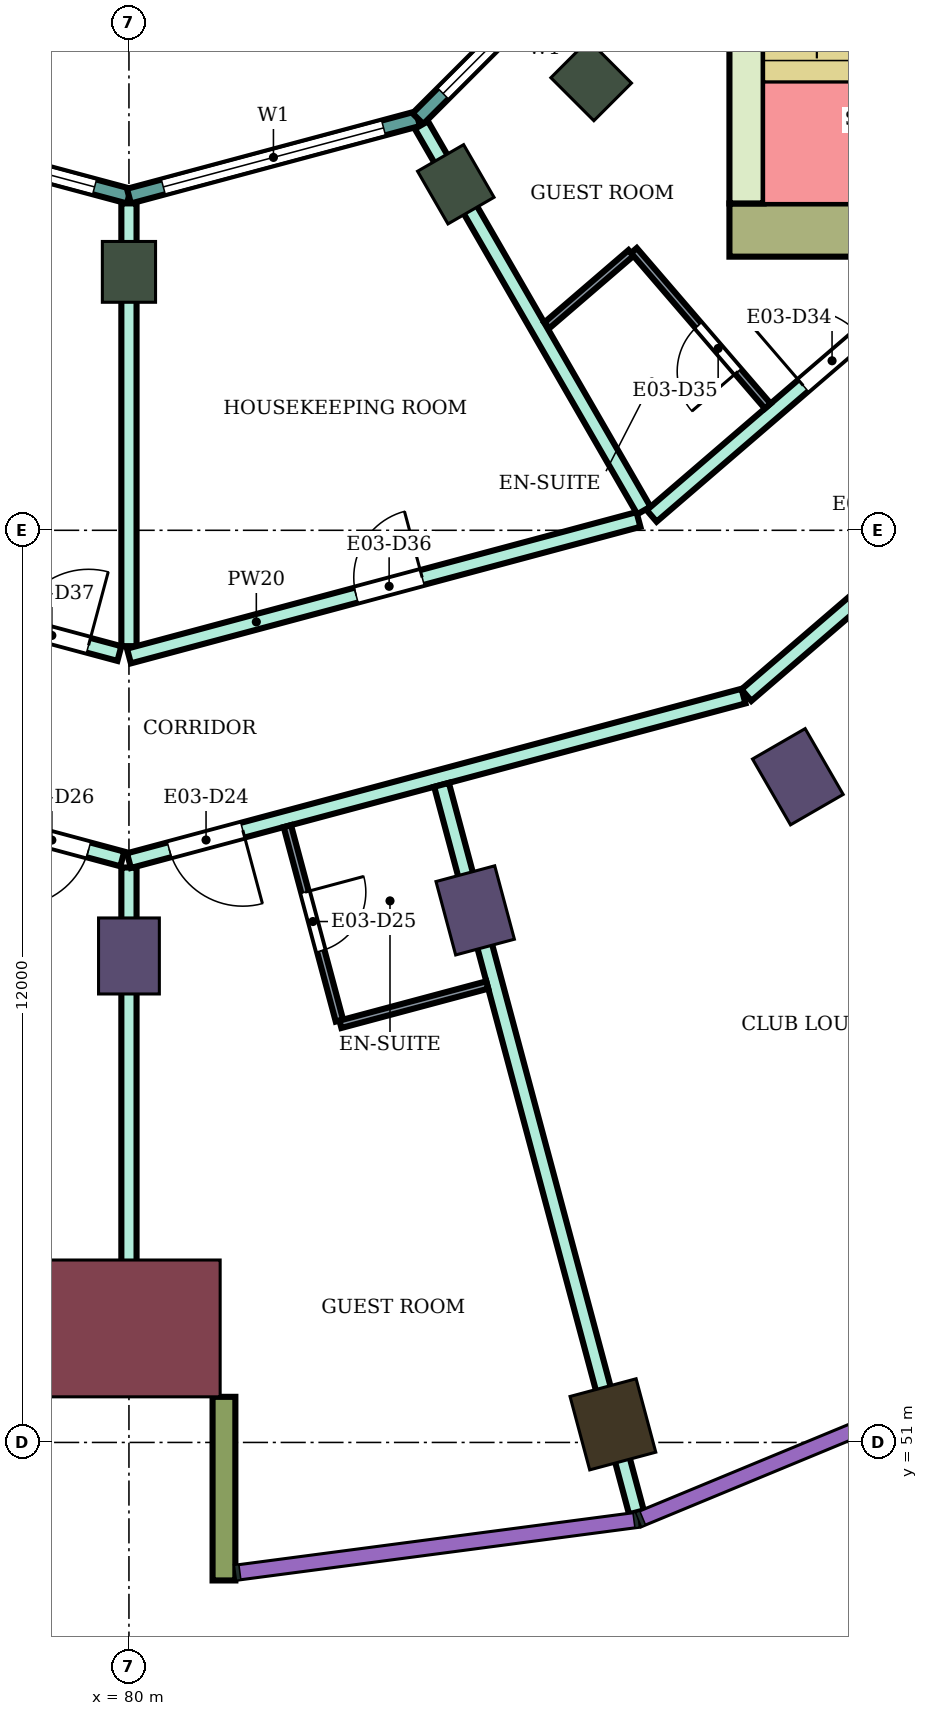
"""IFC4 building model, lengths in metres.
Left out: names, types, materials, properties, quantities, classifications, styles, units other than length and angle.
Written with IfcOpenShell. Run it as: python <this file> out.ifc"""

import sys

from ifc_helpers import new_model, si_unit, direction, frame, frame_2d, origin, origin_2d, place, context, subcontext, project, spatial, rectangle, extrude, element, fill, save


model = new_model("IFC4")
c1 = context("Model", 3, precision=1e-05, world=origin(), true_north=direction((0.0, 1.0)))
c2 = subcontext(c1, "Body", "Model", "MODEL_VIEW")
j1 = project(units=[si_unit("LENGTHUNIT", "METRE"), si_unit("PLANEANGLEUNIT", "RADIAN")], contexts=[c1])
p1 = place(None, origin())
s1 = spatial("IfcSite", under=j1, at=p1, CompositionType="ELEMENT")
p2 = place(p1, origin())
s2 = spatial("IfcBuilding", under=s1, at=p2, CompositionType="ELEMENT")
p3 = place(p2, frame((0.0, 0.0, 141.9)))
s3 = spatial("IfcBuildingStorey", under=s2, at=p3, CompositionType="ELEMENT", Elevation=141.9)
p4 = place(p3, frame((86.367, 51.238, 0.0), z_axis=(0.0, 0.0, 1.0), x_axis=(0.258819045103, -0.965925826289, 0.0)))
e1 = element("IfcColumn", 1, at=p4, inside=s3, PredefinedType="COLUMN", context=c2, shape_type="SweptSolid", body=[
    extrude(rectangle(XDim=1.0, YDim=0.9, at=origin_2d()), origin(), (0.0, 0.0, 1.0), 3.9),
])
for number, where, z_axis, x_axis in (
    (2, (80.0, 57.4, 0.0), (0.0, 0.0, 1.0), (0.0, -1.0, 0.0)),
    (3, (84.555, 58.0, 0.0), (0.0, 0.0, 1.0), (0.259, -0.966, 0.0)),
    (4, (88.8, 59.758, 0.0), (0.0, 0.0, 1.0), (0.5, -0.866, 0.0)),
):
    element("IfcColumn", number, at=place(p3, frame(where, z_axis=z_axis, x_axis=x_axis)), inside=s3, PredefinedType="COLUMN", context=c2, shape_type="SweptSolid", body=[
        extrude(rectangle(XDim=1.0, YDim=0.8, at=origin_2d()), origin(), (0.0, 0.0, 1.0), 3.9),
    ])
for number, where, z_axis, x_axis in (
    (5, (80.0, 66.4, 0.0), (0.0, 0.0, 1.0), (0.0, -1.0, 0.0)),
    (6, (84.3, 67.552, 0.0), (0.0, 0.0, 1.0), (0.5, -0.866, 0.0)),
    (7, (86.081, 68.919, 0.0), (0.0, 0.0, 1.0), (0.707, -0.707, 0.0)),
):
    element("IfcColumn", number, at=place(p3, frame(where, z_axis=z_axis, x_axis=x_axis)), inside=s3, PredefinedType="COLUMN", context=c2, shape_type="SweptSolid", body=[
        extrude(rectangle(XDim=0.8, YDim=0.7, at=origin_2d()), origin(), (0.0, 0.0, 1.0), 3.9),
    ])
p5 = place(p3, frame((80.0, 52.5, 0.0), z_axis=(0.0, 0.0, 1.0), x_axis=(0.0, -1.0, 0.0)))
e8 = element("IfcColumn", 8, at=p5, inside=s3, PredefinedType="COLUMN", context=c2, shape_type="SweptSolid", body=[
    extrude(rectangle(XDim=1.8, YDim=2.4, at=origin_2d()), origin(), (0.0, 0.0, 1.0), 3.9),
])
p6 = place(p3, frame((87.9, 66.95, 0.0), z_axis=(0.0, 0.0, 1.0), x_axis=(1.0, 0.0, 0.0)))
e9 = element("IfcWall", 9, at=p6, inside=s3, PredefinedType="SHEAR", context=c2, shape_type="SweptSolid", body=[
    extrude(rectangle(XDim=14.8, YDim=0.7, at=frame_2d((7.4, 0.0))), origin(), (0.0, 0.0, 1.0), 3.58),
])
p7 = place(p6, frame((4.2, 0.0, 0.0)))
e10 = element("IfcOpeningElement", 10, at=p7, cuts=e9, PredefinedType="OPENING", context=c2, shape_type="SweptSolid", body=[
    extrude(rectangle(XDim=2.4, YDim=2.4, at=frame_2d((1.2, 1.2))), frame((0.0, 0.36, 0.0), z_axis=(0.0, -1.0, 0.0), x_axis=(1.0, 0.0, 0.0)), (0.0, 0.0, 1.0), 0.72),
])
p8 = place(p3, frame((88.125, 67.3, 0.0), z_axis=(0.0, 0.0, 1.0), x_axis=(0.0, 1.0, 0.0)))
e11 = element("IfcWall", 11, at=p8, inside=s3, PredefinedType="SHEAR", context=c2, shape_type="SweptSolid", body=[
    extrude(rectangle(XDim=7.7, YDim=0.45, at=frame_2d((3.85, 0.0))), origin(), (0.0, 0.0, 1.0), 3.58),
])
p9 = place(p3, frame((81.25, 51.6, 0.0), z_axis=(0.0, 0.0, 1.0), x_axis=(0.0, -1.0, 0.0)))
e12 = element("IfcWall", 12, at=p9, inside=s3, PredefinedType="NOTDEFINED", context=c2, shape_type="SweptSolid", body=[
    extrude(rectangle(XDim=2.416, YDim=0.3, at=frame_2d((1.208, 0.0))), origin(), (0.0, 0.0, 1.0), 3.9),
])
p10 = place(p3, frame((76.198, 68.415, 0.0), z_axis=(0.0, 0.0, 1.0), x_axis=(0.965933654434, -0.258789828301, 0.0)))
e13 = element("IfcWall", 13, at=p10, inside=s3, PredefinedType="NOTDEFINED", context=c2, shape_type="SweptSolid", body=[
    extrude(rectangle(XDim=3.936, YDim=0.2, at=frame_2d((1.968, 0.0))), origin(), (0.0, 0.0, 1.0), 3.9),
])
p11 = place(p10, frame((0.468, 0.0, 0.9)))
e14 = element("IfcOpeningElement", 14, at=p11, cuts=e13, PredefinedType="OPENING", context=c2, shape_type="SweptSolid", body=[
    extrude(rectangle(XDim=3.0, YDim=2.3, at=frame_2d((1.5, 1.15))), frame((0.0, 0.11, 0.0), z_axis=(0.0, -1.0, 0.0), x_axis=(1.0, 0.0, 0.0)), (0.0, 0.0, 1.0), 0.22),
])
p12 = place(p3, frame((80.0, 67.396, 0.0), z_axis=(0.0, 0.0, 1.0), x_axis=(0.965933654434, 0.258789828301, 0.0)))
e15 = element("IfcWall", 15, at=p12, inside=s3, PredefinedType="NOTDEFINED", context=c2, shape_type="SweptSolid", body=[
    extrude(rectangle(XDim=3.936, YDim=0.2, at=frame_2d((1.968, 0.0))), origin(), (0.0, 0.0, 1.0), 3.9),
])
p13 = place(p12, frame((0.468, 0.0, 0.9)))
e16 = element("IfcOpeningElement", 16, at=p13, cuts=e15, PredefinedType="OPENING", context=c2, shape_type="SweptSolid", body=[
    extrude(rectangle(XDim=3.0, YDim=2.3, at=frame_2d((1.5, 1.15))), frame((0.0, 0.11, 0.0), z_axis=(0.0, -1.0, 0.0), x_axis=(1.0, 0.0, 0.0)), (0.0, 0.0, 1.0), 0.22),
])
p14 = place(p3, frame((83.802, 68.415, 0.0), z_axis=(0.0, 0.0, 1.0), x_axis=(0.707106781187, 0.707106781187, 0.0)))
e17 = element("IfcWall", 17, at=p14, inside=s3, PredefinedType="NOTDEFINED", context=c2, shape_type="SweptSolid", body=[
    extrude(rectangle(XDim=3.936, YDim=0.2, at=frame_2d((1.968, 0.0))), origin(), (0.0, 0.0, 1.0), 3.9),
])
p15 = place(p14, frame((0.468, 0.0, 0.9)))
e18 = element("IfcOpeningElement", 18, at=p15, cuts=e17, PredefinedType="OPENING", context=c2, shape_type="SweptSolid", body=[
    extrude(rectangle(XDim=3.0, YDim=2.3, at=frame_2d((1.5, 1.15))), frame((0.0, 0.11, 0.0), z_axis=(0.0, -1.0, 0.0), x_axis=(1.0, 0.0, 0.0)), (0.0, 0.0, 1.0), 0.22),
])
p16 = place(p3, frame((71.877, 60.832, 0.0), z_axis=(0.0, 0.0, 1.0), x_axis=(0.965852509869, -0.259092510851, 0.0)))
e19 = element("IfcWall", 19, at=p16, inside=s3, PredefinedType="PARTITIONING", context=c2, shape_type="SweptSolid", body=[
    extrude(rectangle(XDim=8.32, YDim=0.2, at=frame_2d((4.16, 0.0))), origin(), (0.0, 0.0, 1.0), 3.45),
])
p17 = place(p16, frame((6.86, 0.0, 0.0)))
e20 = element("IfcOpeningElement", 20, at=p17, cuts=e19, PredefinedType="OPENING", context=c2, shape_type="SweptSolid", body=[
    extrude(rectangle(XDim=1.0, YDim=2.1, at=frame_2d((0.5, 1.05))), frame((0.0, 0.11, 0.0), z_axis=(0.0, -1.0, 0.0), x_axis=(1.0, 0.0, 0.0)), (0.0, 0.0, 1.0), 0.22),
])
p18 = place(p16, frame((0.55, 0.0, 0.0)))
e21 = element("IfcOpeningElement", 21, at=p18, cuts=e19, PredefinedType="OPENING", context=c2, shape_type="SweptSolid", body=[
    extrude(rectangle(XDim=1.0, YDim=2.1, at=frame_2d((0.5, 1.05))), frame((0.0, 0.11, 0.0), z_axis=(0.0, -1.0, 0.0), x_axis=(1.0, 0.0, 0.0)), (0.0, 0.0, 1.0), 0.22),
])
p19 = place(p3, frame((73.297, 63.143, 0.0), z_axis=(0.0, 0.0, 1.0), x_axis=(0.965859030528, -0.25906820173, 0.0)))
e22 = element("IfcWall", 22, at=p19, inside=s3, PredefinedType="PARTITIONING", context=c2, shape_type="SweptSolid", body=[
    extrude(rectangle(XDim=6.81, YDim=0.2, at=frame_2d((3.405, 0.0))), origin(), (0.0, 0.0, 1.0), 3.45),
])
p20 = place(p19, frame((5.39, 0.0, 0.0)))
e23 = element("IfcOpeningElement", 23, at=p20, cuts=e22, PredefinedType="OPENING", context=c2, shape_type="SweptSolid", body=[
    extrude(rectangle(XDim=1.0, YDim=2.1, at=frame_2d((0.5, 1.05))), frame((0.0, 0.11, 0.0), z_axis=(0.0, -1.0, 0.0), x_axis=(1.0, 0.0, 0.0)), (0.0, 0.0, 1.0), 0.22),
])
p21 = place(p3, frame((80.0, 51.8, 0.0), z_axis=(0.0, 0.0, 1.0), x_axis=(0.0, 1.0, 0.0)))
e24 = element("IfcWall", 24, at=p21, inside=s3, PredefinedType="PARTITIONING", context=c2, shape_type="SweptSolid", body=[
    extrude(rectangle(XDim=6.764, YDim=0.2, at=frame_2d((3.382, 0.0))), origin(), (0.0, 0.0, 1.0), 3.45),
])
p22 = place(p3, frame((80.0, 58.654, 0.0), z_axis=(0.0, 0.0, 1.0), x_axis=(0.965979808777, 0.25861749561, 0.0)))
e25 = element("IfcWall", 25, at=p22, inside=s3, PredefinedType="PARTITIONING", context=c2, shape_type="SweptSolid", body=[
    extrude(rectangle(XDim=8.37, YDim=0.2, at=frame_2d((4.185, 0.0))), origin(), (0.0, 0.0, 1.0), 3.45),
])
p23 = place(p22, frame((0.55, 0.0, 0.0)))
e26 = element("IfcOpeningElement", 26, at=p23, cuts=e25, PredefinedType="OPENING", context=c2, shape_type="SweptSolid", body=[
    extrude(rectangle(XDim=1.0, YDim=2.1, at=frame_2d((0.5, 1.05))), frame((0.0, 0.11, 0.0), z_axis=(0.0, -1.0, 0.0), x_axis=(1.0, 0.0, 0.0)), (0.0, 0.0, 1.0), 0.22),
])
p24 = place(p3, frame((80.0, 61.476, 0.0), z_axis=(0.0, 0.0, 1.0), x_axis=(0.0, 1.0, 0.0)))
e27 = element("IfcWall", 27, at=p24, inside=s3, PredefinedType="PARTITIONING", context=c2, shape_type="SweptSolid", body=[
    extrude(rectangle(XDim=5.825, YDim=0.2, at=frame_2d((2.913, 0.0))), origin(), (0.0, 0.0, 1.0), 3.45),
])
p25 = place(p3, frame((80.0, 61.346, 0.0), z_axis=(0.0, 0.0, 1.0), x_axis=(0.965915385935, 0.25885800589, 0.0)))
e28 = element("IfcWall", 28, at=p25, inside=s3, PredefinedType="PARTITIONING", context=c2, shape_type="SweptSolid", body=[
    extrude(rectangle(XDim=6.94, YDim=0.2, at=frame_2d((3.47, 0.0))), origin(), (0.0, 0.0, 1.0), 3.45),
])
p26 = place(p25, frame((3.094, 0.0, 0.0)))
e29 = element("IfcOpeningElement", 29, at=p26, cuts=e28, PredefinedType="OPENING", context=c2, shape_type="SweptSolid", body=[
    extrude(rectangle(XDim=0.9, YDim=2.1, at=frame_2d((0.45, 1.05))), frame((0.0, 0.11, 0.0), z_axis=(0.0, -1.0, 0.0), x_axis=(1.0, 0.0, 0.0)), (0.0, 0.0, 1.0), 0.22),
])
p27 = place(p3, frame((83.847, 68.332, 0.0), z_axis=(0.0, 0.0, 1.0), x_axis=(0.499901724708, -0.866082135617, 0.0)))
e30 = element("IfcWall", 30, at=p27, inside=s3, PredefinedType="PARTITIONING", context=c2, shape_type="SweptSolid", body=[
    extrude(rectangle(XDim=5.855, YDim=0.2, at=frame_2d((2.928, 0.0))), origin(), (0.0, 0.0, 1.0), 3.45),
])
p28 = place(p3, frame((84.112, 59.652, 0.0), z_axis=(0.0, 0.0, 1.0), x_axis=(0.25878658041, -0.965934524593, 0.0)))
e31 = element("IfcWall", 31, at=p28, inside=s3, PredefinedType="PARTITIONING", context=c2, shape_type="SweptSolid", body=[
    extrude(rectangle(XDim=9.909, YDim=0.2, at=frame_2d((4.954, 0.0))), origin(), (0.0, 0.0, 1.0), 3.45),
])
p29 = place(p3, frame((86.877, 63.189, 0.0), z_axis=(0.0, 0.0, 1.0), x_axis=(0.758164888471, 0.652062881853, 0.0)))
e32 = element("IfcWall", 32, at=p29, inside=s3, PredefinedType="PARTITIONING", context=c2, shape_type="SweptSolid", body=[
    extrude(rectangle(XDim=5.23, YDim=0.2, at=frame_2d((2.615, 0.0))), origin(), (0.0, 0.0, 1.0), 3.45),
])
p30 = place(p29, frame((2.63, 0.0, 0.0)))
e33 = element("IfcOpeningElement", 33, at=p30, cuts=e32, PredefinedType="OPENING", context=c2, shape_type="SweptSolid", body=[
    extrude(rectangle(XDim=1.0, YDim=2.1, at=frame_2d((0.5, 1.05))), frame((0.0, 0.11, 0.0), z_axis=(0.0, -1.0, 0.0), x_axis=(1.0, 0.0, 0.0)), (0.0, 0.0, 1.0), 0.22),
])
p31 = place(p3, frame((88.123, 60.831, 0.0), z_axis=(0.0, 0.0, 1.0), x_axis=(0.758118199374, 0.652117164149, 0.0)))
e34 = element("IfcWall", 34, at=p31, inside=s3, PredefinedType="PARTITIONING", context=c2, shape_type="SweptSolid", body=[
    extrude(rectangle(XDim=6.486, YDim=0.2, at=frame_2d((3.243, 0.0))), origin(), (0.0, 0.0, 1.0), 3.45),
])
p32 = place(p31, frame((2.073, 0.0, 0.0)))
e35 = element("IfcOpeningElement", 35, at=p32, cuts=e34, PredefinedType="OPENING", context=c2, shape_type="SweptSolid", body=[
    extrude(rectangle(XDim=1.8, YDim=2.1, at=frame_2d((0.9, 1.05))), frame((0.0, 0.11, 0.0), z_axis=(0.0, -1.0, 0.0), x_axis=(1.0, 0.0, 0.0)), (0.0, 0.0, 1.0), 0.22),
])
p33 = place(p3, frame((82.084, 59.108, 0.0), z_axis=(0.0, 0.0, 1.0), x_axis=(0.258591746437, -0.965986702121, 0.0)))
e36 = element("IfcWall", 36, at=p33, inside=s3, PredefinedType="PARTITIONING", context=c2, shape_type="SweptSolid", body=[
    extrude(rectangle(XDim=2.649, YDim=0.1, at=frame_2d((1.325, 0.0))), origin(), (0.0, 0.0, 1.0), 3.45),
])
p34 = place(p33, frame((0.9, 0.0, 0.0)))
e37 = element("IfcOpeningElement", 37, at=p34, cuts=e36, PredefinedType="OPENING", context=c2, shape_type="SweptSolid", body=[
    extrude(rectangle(XDim=0.8, YDim=2.1, at=frame_2d((0.4, 1.05))), frame((0.0, 0.06, 0.0), z_axis=(0.0, -1.0, 0.0), x_axis=(1.0, 0.0, 0.0)), (0.0, 0.0, 1.0), 0.12),
])
p35 = place(p3, frame((82.782, 56.501, 0.0), z_axis=(0.0, 0.0, 1.0), x_axis=(0.966003594778, 0.258528634539, 0.0)))
e38 = element("IfcWall", 38, at=p35, inside=s3, PredefinedType="PARTITIONING", context=c2, shape_type="SweptSolid", body=[
    extrude(rectangle(XDim=2.0, YDim=0.1, at=frame_2d((1.0, 0.0))), origin(), (0.0, 0.0, 1.0), 3.45),
])
p36 = place(p3, frame((85.497, 65.696, 0.0), z_axis=(0.0, 0.0, 1.0), x_axis=(0.75817032582, 0.652056559698, 0.0)))
e39 = element("IfcWall", 39, at=p36, inside=s3, PredefinedType="PARTITIONING", context=c2, shape_type="SweptSolid", body=[
    extrude(rectangle(XDim=1.461, YDim=0.1, at=frame_2d((0.73, 0.0))), origin(), (0.0, 0.0, 1.0), 3.45),
])
p37 = place(p3, frame((86.643, 66.681, 0.0), z_axis=(0.0, 0.0, 1.0), x_axis=(0.652264876065, -0.757991115682, 0.0)))
e40 = element("IfcWall", 40, at=p37, inside=s3, PredefinedType="PARTITIONING", context=c2, shape_type="SweptSolid", body=[
    extrude(rectangle(XDim=2.699, YDim=0.1, at=frame_2d((1.35, 0.0))), origin(), (0.0, 0.0, 1.0), 3.45),
])
p38 = place(p37, frame((1.3, 0.0, 0.0)))
e41 = element("IfcOpeningElement", 41, at=p38, cuts=e40, PredefinedType="OPENING", context=c2, shape_type="SweptSolid", body=[
    extrude(rectangle(XDim=0.8, YDim=2.1, at=frame_2d((0.4, 1.05))), frame((0.0, 0.06, 0.0), z_axis=(0.0, -1.0, 0.0), x_axis=(1.0, 0.0, 0.0)), (0.0, 0.0, 1.0), 0.12),
])
p39 = place(p11, origin())
e42 = element("IfcWindow", 42, at=p39, inside=s3, PartitioningType="SINGLE_PANEL", PredefinedType="WINDOW", context=c2, shape_type="SweptSolid", body=[
    extrude(rectangle(XDim=3.0, YDim=2.3, at=frame_2d((1.5, 1.15))), frame((0.0, 0.03, 0.0), z_axis=(0.0, -1.0, 0.0), x_axis=(1.0, 0.0, 0.0)), (0.0, 0.0, 1.0), 0.06),
])
fill(e14, e42)
p40 = place(p13, origin())
e43 = element("IfcWindow", 43, at=p40, inside=s3, PartitioningType="SINGLE_PANEL", PredefinedType="WINDOW", context=c2, shape_type="SweptSolid", body=[
    extrude(rectangle(XDim=3.0, YDim=2.3, at=frame_2d((1.5, 1.15))), frame((0.0, 0.03, 0.0), z_axis=(0.0, -1.0, 0.0), x_axis=(1.0, 0.0, 0.0)), (0.0, 0.0, 1.0), 0.06),
])
fill(e16, e43)
p41 = place(p15, origin())
e44 = element("IfcWindow", 44, at=p41, inside=s3, PartitioningType="SINGLE_PANEL", PredefinedType="WINDOW", context=c2, shape_type="SweptSolid", body=[
    extrude(rectangle(XDim=3.0, YDim=2.3, at=frame_2d((1.5, 1.15))), frame((0.0, 0.03, 0.0), z_axis=(0.0, -1.0, 0.0), x_axis=(1.0, 0.0, 0.0)), (0.0, 0.0, 1.0), 0.06),
])
fill(e18, e44)
p42 = place(p23, frame((1.0, 0.0, 0.0), z_axis=(0.0, 0.0, 1.0), x_axis=(-1.0, 0.0, 0.0)))
e45 = element("IfcDoor", 45, at=p42, inside=s3, OperationType="SINGLE_SWING_LEFT", PredefinedType="DOOR", context=c2, shape_type="SweptSolid", body=[
    extrude(rectangle(XDim=1.0, YDim=2.1, at=frame_2d((0.5, 1.05))), frame((0.0, 0.025, 0.0), z_axis=(0.0, -1.0, 0.0), x_axis=(1.0, 0.0, 0.0)), (0.0, 0.0, 1.0), 0.05),
])
fill(e26, e45)
p43 = place(p34, origin())
e46 = element("IfcDoor", 46, at=p43, inside=s3, OperationType="SINGLE_SWING_LEFT", PredefinedType="DOOR", context=c2, shape_type="SweptSolid", body=[
    extrude(rectangle(XDim=0.8, YDim=2.1, at=frame_2d((0.4, 1.05))), frame((0.0, 0.025, 0.0), z_axis=(0.0, -1.0, 0.0), x_axis=(1.0, 0.0, 0.0)), (0.0, 0.0, 1.0), 0.05),
])
fill(e37, e46)
p44 = place(p17, frame((1.0, 0.0, 0.0), z_axis=(0.0, 0.0, 1.0), x_axis=(-1.0, 0.0, 0.0)))
e47 = element("IfcDoor", 47, at=p44, inside=s3, OperationType="SINGLE_SWING_RIGHT", PredefinedType="DOOR", context=c2, shape_type="SweptSolid", body=[
    extrude(rectangle(XDim=1.0, YDim=2.1, at=frame_2d((0.5, 1.05))), frame((0.0, 0.025, 0.0), z_axis=(0.0, -1.0, 0.0), x_axis=(1.0, 0.0, 0.0)), (0.0, 0.0, 1.0), 0.05),
])
fill(e20, e47)
p45 = place(p30, origin())
e48 = element("IfcDoor", 48, at=p45, inside=s3, OperationType="SINGLE_SWING_LEFT", PredefinedType="DOOR", context=c2, shape_type="SweptSolid", body=[
    extrude(rectangle(XDim=1.0, YDim=2.1, at=frame_2d((0.5, 1.05))), frame((0.0, 0.025, 0.0), z_axis=(0.0, -1.0, 0.0), x_axis=(1.0, 0.0, 0.0)), (0.0, 0.0, 1.0), 0.05),
])
fill(e33, e48)
p46 = place(p38, frame((0.8, 0.0, 0.0), z_axis=(0.0, 0.0, 1.0), x_axis=(-1.0, 0.0, 0.0)))
e49 = element("IfcDoor", 49, at=p46, inside=s3, OperationType="SINGLE_SWING_LEFT", PredefinedType="DOOR", context=c2, shape_type="SweptSolid", body=[
    extrude(rectangle(XDim=0.8, YDim=2.1, at=frame_2d((0.4, 1.05))), frame((0.0, 0.025, 0.0), z_axis=(0.0, -1.0, 0.0), x_axis=(1.0, 0.0, 0.0)), (0.0, 0.0, 1.0), 0.05),
])
fill(e41, e49)
p47 = place(p26, origin())
e50 = element("IfcDoor", 50, at=p47, inside=s3, OperationType="SINGLE_SWING_RIGHT", PredefinedType="DOOR", context=c2, shape_type="SweptSolid", body=[
    extrude(rectangle(XDim=0.9, YDim=2.1, at=frame_2d((0.45, 1.05))), frame((0.0, 0.025, 0.0), z_axis=(0.0, -1.0, 0.0), x_axis=(1.0, 0.0, 0.0)), (0.0, 0.0, 1.0), 0.05),
])
fill(e29, e50)
p48 = place(p20, origin())
e51 = element("IfcDoor", 51, at=p48, inside=s3, OperationType="SINGLE_SWING_RIGHT", PredefinedType="DOOR", context=c2, shape_type="SweptSolid", body=[
    extrude(rectangle(XDim=1.0, YDim=2.1, at=frame_2d((0.5, 1.05))), frame((0.0, 0.025, 0.0), z_axis=(0.0, -1.0, 0.0), x_axis=(1.0, 0.0, 0.0)), (0.0, 0.0, 1.0), 0.05),
])
fill(e23, e51)
save(model, sys.argv[1])
